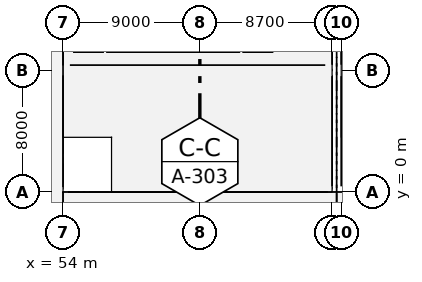
"""IFC4 building model, lengths in metres.
Left out: names, types, materials, properties, quantities, classifications, styles, units other than length and angle.
Written with IfcOpenShell. Run it as: python <this file> out.ifc"""

import sys

from ifc_helpers import new_model, si_unit, direction, frame, frame_2d, origin, origin_2d, place, context, subcontext, project, spatial, rectangle, extrude, element, fill, save


model = new_model("IFC4")
c1 = context("Model", 3, precision=1e-05, world=origin(), true_north=direction((0.0, 1.0)))
c2 = subcontext(c1, "Body", "Model", "MODEL_VIEW")
j1 = project(units=[si_unit("LENGTHUNIT", "METRE"), si_unit("PLANEANGLEUNIT", "RADIAN")], contexts=[c1])
p1 = place(None, origin())
s1 = spatial("IfcSite", under=j1, at=p1, CompositionType="ELEMENT")
p2 = place(p1, origin())
s2 = spatial("IfcBuilding", under=s1, at=p2, CompositionType="ELEMENT")
p3 = place(p2, origin())
s3 = spatial("IfcBuildingStorey", under=s2, at=p3, CompositionType="ELEMENT", Elevation=0.0)
for number, where, z_axis, x_axis in (
    (1, (54.0, 0.0, -0.5), (0.0, 0.0, 1.0), (1.0, 0.0, 0.0)),
    (2, (54.0, 8.0, -0.5), (0.0, 0.0, 1.0), (1.0, 0.0, 0.0)),
    (3, (63.0, 0.0, -0.5), (0.0, 0.0, 1.0), (1.0, 0.0, 0.0)),
    (4, (63.0, 8.0, -0.5), (0.0, 0.0, 1.0), (1.0, 0.0, 0.0)),
):
    element("IfcColumn", number, at=place(p3, frame(where, z_axis=z_axis, x_axis=x_axis)), inside=s3, PredefinedType="COLUMN", context=c2, shape_type="SweptSolid", body=[
        extrude(rectangle(XDim=0.65, YDim=0.65, at=origin_2d()), origin(), (0.0, 0.0, 1.0), 6.8),
    ])
for number, where, z_axis, x_axis in (
    (5, (71.7, 0.0, -0.5), (0.0, 0.0, 1.0), (1.0, 0.0, 0.0)),
    (6, (71.7, 8.0, -0.5), (0.0, 0.0, 1.0), (1.0, 0.0, 0.0)),
    (7, (72.3, 0.0, -0.5), (0.0, 0.0, 1.0), (1.0, 0.0, 0.0)),
    (8, (72.3, 8.0, -0.5), (0.0, 0.0, 1.0), (1.0, 0.0, 0.0)),
):
    element("IfcColumn", number, at=place(p3, frame(where, z_axis=z_axis, x_axis=x_axis)), inside=s3, PredefinedType="COLUMN", context=c2, shape_type="SweptSolid", body=[
        extrude(rectangle(XDim=0.55, YDim=0.75, at=origin_2d()), origin(), (0.0, 0.0, 1.0), 6.8),
    ])
p4 = place(p3, frame((54.325, 0.0, 0.0), z_axis=(0.0, 0.0, 1.0), x_axis=(1.0, 0.0, 0.0)))
e9 = element("IfcWall", 9, at=p4, inside=s3, PredefinedType="SOLIDWALL", context=c2, shape_type="SweptSolid", body=[
    extrude(rectangle(XDim=8.35, YDim=0.34, at=frame_2d((4.175, 0.0))), origin(), (0.0, 0.0, 1.0), 4.98),
])
p5 = place(p4, frame((1.883, 0.0, 0.85)))
e10 = element("IfcOpeningElement", 10, at=p5, cuts=e9, PredefinedType="OPENING", context=c2, shape_type="SweptSolid", body=[
    extrude(rectangle(XDim=1.8, YDim=3.15, at=frame_2d((0.9, 1.575))), frame((0.0, 0.18, 0.0), z_axis=(0.0, -1.0, 0.0), x_axis=(1.0, 0.0, 0.0)), (0.0, 0.0, 1.0), 0.36),
])
p6 = place(p4, frame((4.667, 0.0, 0.85)))
e11 = element("IfcOpeningElement", 11, at=p6, cuts=e9, PredefinedType="OPENING", context=c2, shape_type="SweptSolid", body=[
    extrude(rectangle(XDim=1.8, YDim=3.15, at=frame_2d((0.9, 1.575))), frame((0.0, 0.18, 0.0), z_axis=(0.0, -1.0, 0.0), x_axis=(1.0, 0.0, 0.0)), (0.0, 0.0, 1.0), 0.36),
])
p7 = place(p3, frame((63.325, 0.0, 0.0), z_axis=(0.0, 0.0, 1.0), x_axis=(1.0, 0.0, 0.0)))
e12 = element("IfcWall", 12, at=p7, inside=s3, PredefinedType="SOLIDWALL", context=c2, shape_type="SweptSolid", body=[
    extrude(rectangle(XDim=8.1, YDim=0.34, at=frame_2d((4.05, 0.0))), origin(), (0.0, 0.0, 1.0), 4.98),
])
p8 = place(p7, frame((1.8, 0.0, 0.85)))
e13 = element("IfcOpeningElement", 13, at=p8, cuts=e12, PredefinedType="OPENING", context=c2, shape_type="SweptSolid", body=[
    extrude(rectangle(XDim=1.8, YDim=3.15, at=frame_2d((0.9, 1.575))), frame((0.0, 0.18, 0.0), z_axis=(0.0, -1.0, 0.0), x_axis=(1.0, 0.0, 0.0)), (0.0, 0.0, 1.0), 0.36),
])
p9 = place(p7, frame((4.5, 0.0, 0.85)))
e14 = element("IfcOpeningElement", 14, at=p9, cuts=e12, PredefinedType="OPENING", context=c2, shape_type="SweptSolid", body=[
    extrude(rectangle(XDim=1.8, YDim=3.15, at=frame_2d((0.9, 1.575))), frame((0.0, 0.18, 0.0), z_axis=(0.0, -1.0, 0.0), x_axis=(1.0, 0.0, 0.0)), (0.0, 0.0, 1.0), 0.36),
])
p10 = place(p3, frame((54.0, 0.325, 0.0), z_axis=(0.0, 0.0, 1.0), x_axis=(0.0, 1.0, 0.0)))
e15 = element("IfcWall", 15, at=p10, inside=s3, PredefinedType="SOLIDWALL", context=c2, shape_type="SweptSolid", body=[
    extrude(rectangle(XDim=7.35, YDim=0.34, at=frame_2d((3.675, 0.0))), origin(), (0.0, 0.0, 1.0), 5.23),
])
p11 = place(p10, frame((1.55, 0.0, 0.85)))
e16 = element("IfcOpeningElement", 16, at=p11, cuts=e15, PredefinedType="OPENING", context=c2, shape_type="SweptSolid", body=[
    extrude(rectangle(XDim=1.8, YDim=3.15, at=frame_2d((0.9, 1.575))), frame((0.0, 0.18, 0.0), z_axis=(0.0, -1.0, 0.0), x_axis=(1.0, 0.0, 0.0)), (0.0, 0.0, 1.0), 0.36),
])
p12 = place(p10, frame((4.0, 0.0, 0.85)))
e17 = element("IfcOpeningElement", 17, at=p12, cuts=e15, PredefinedType="OPENING", context=c2, shape_type="SweptSolid", body=[
    extrude(rectangle(XDim=1.8, YDim=3.15, at=frame_2d((0.9, 1.575))), frame((0.0, 0.18, 0.0), z_axis=(0.0, -1.0, 0.0), x_axis=(1.0, 0.0, 0.0)), (0.0, 0.0, 1.0), 0.36),
])
p13 = place(p3, frame((54.0, 8.325, 0.0), z_axis=(0.0, 0.0, 1.0), x_axis=(0.0, 1.0, 0.0)))
e18 = element("IfcWall", 18, at=p13, inside=s3, PredefinedType="SOLIDWALL", context=c2, shape_type="SweptSolid", body=[
    extrude(rectangle(XDim=7.35, YDim=0.34, at=frame_2d((3.675, 0.0))), origin(), (0.0, 0.0, 1.0), 5.23),
])
p14 = place(p13, frame((1.55, 0.0, 0.85)))
e19 = element("IfcOpeningElement", 19, at=p14, cuts=e18, PredefinedType="OPENING", context=c2, shape_type="SweptSolid", body=[
    extrude(rectangle(XDim=1.8, YDim=3.15, at=frame_2d((0.9, 1.575))), frame((0.0, 0.18, 0.0), z_axis=(0.0, -1.0, 0.0), x_axis=(1.0, 0.0, 0.0)), (0.0, 0.0, 1.0), 0.36),
])
p15 = place(p13, frame((4.0, 0.0, 0.85)))
e20 = element("IfcOpeningElement", 20, at=p15, cuts=e18, PredefinedType="OPENING", context=c2, shape_type="SweptSolid", body=[
    extrude(rectangle(XDim=1.8, YDim=3.15, at=frame_2d((0.9, 1.575))), frame((0.0, 0.18, 0.0), z_axis=(0.0, -1.0, 0.0), x_axis=(1.0, 0.0, 0.0)), (0.0, 0.0, 1.0), 0.36),
])
p16 = place(p3, frame((71.7, 0.375, 0.0), z_axis=(0.0, 0.0, 1.0), x_axis=(0.0, 1.0, 0.0)))
e21 = element("IfcWall", 21, at=p16, inside=s3, PredefinedType="SOLIDWALL", context=c2, shape_type="SweptSolid", body=[
    extrude(rectangle(XDim=7.25, YDim=0.34, at=frame_2d((3.625, 0.0))), origin(), (0.0, 0.0, 1.0), 4.98),
])
p17 = place(p16, frame((1.517, 0.0, 0.85)))
e22 = element("IfcOpeningElement", 22, at=p17, cuts=e21, PredefinedType="OPENING", context=c2, shape_type="SweptSolid", body=[
    extrude(rectangle(XDim=1.8, YDim=3.15, at=frame_2d((0.9, 1.575))), frame((0.0, 0.18, 0.0), z_axis=(0.0, -1.0, 0.0), x_axis=(1.0, 0.0, 0.0)), (0.0, 0.0, 1.0), 0.36),
])
p18 = place(p16, frame((3.933, 0.0, 0.85)))
e23 = element("IfcOpeningElement", 23, at=p18, cuts=e21, PredefinedType="OPENING", context=c2, shape_type="SweptSolid", body=[
    extrude(rectangle(XDim=1.8, YDim=3.15, at=frame_2d((0.9, 1.575))), frame((0.0, 0.18, 0.0), z_axis=(0.0, -1.0, 0.0), x_axis=(1.0, 0.0, 0.0)), (0.0, 0.0, 1.0), 0.36),
])
p19 = place(p3, frame((71.7, 8.375, 0.0), z_axis=(0.0, 0.0, 1.0), x_axis=(0.0, 1.0, 0.0)))
e24 = element("IfcWall", 24, at=p19, inside=s3, PredefinedType="SOLIDWALL", context=c2, shape_type="SweptSolid", body=[
    extrude(rectangle(XDim=7.25, YDim=0.34, at=frame_2d((3.625, 0.0))), origin(), (0.0, 0.0, 1.0), 4.98),
])
p20 = place(p19, frame((1.517, 0.0, 0.85)))
e25 = element("IfcOpeningElement", 25, at=p20, cuts=e24, PredefinedType="OPENING", context=c2, shape_type="SweptSolid", body=[
    extrude(rectangle(XDim=1.8, YDim=3.15, at=frame_2d((0.9, 1.575))), frame((0.0, 0.18, 0.0), z_axis=(0.0, -1.0, 0.0), x_axis=(1.0, 0.0, 0.0)), (0.0, 0.0, 1.0), 0.36),
])
p21 = place(p19, frame((3.933, 0.0, 0.85)))
e26 = element("IfcOpeningElement", 26, at=p21, cuts=e24, PredefinedType="OPENING", context=c2, shape_type="SweptSolid", body=[
    extrude(rectangle(XDim=1.8, YDim=3.15, at=frame_2d((0.9, 1.575))), frame((0.0, 0.18, 0.0), z_axis=(0.0, -1.0, 0.0), x_axis=(1.0, 0.0, 0.0)), (0.0, 0.0, 1.0), 0.36),
])
p22 = place(p3, frame((72.3, 0.375, 0.0), z_axis=(0.0, 0.0, 1.0), x_axis=(0.0, 1.0, 0.0)))
e27 = element("IfcWall", 27, at=p22, inside=s3, PredefinedType="SOLIDWALL", context=c2, shape_type="SweptSolid", body=[
    extrude(rectangle(XDim=7.25, YDim=0.34, at=frame_2d((3.625, 0.0))), origin(), (0.0, 0.0, 1.0), 5.1),
])
p23 = place(p22, frame((1.517, 0.0, 0.85)))
e28 = element("IfcOpeningElement", 28, at=p23, cuts=e27, PredefinedType="OPENING", context=c2, shape_type="SweptSolid", body=[
    extrude(rectangle(XDim=1.8, YDim=3.15, at=frame_2d((0.9, 1.575))), frame((0.0, 0.18, 0.0), z_axis=(0.0, -1.0, 0.0), x_axis=(1.0, 0.0, 0.0)), (0.0, 0.0, 1.0), 0.36),
])
p24 = place(p22, frame((3.933, 0.0, 0.85)))
e29 = element("IfcOpeningElement", 29, at=p24, cuts=e27, PredefinedType="OPENING", context=c2, shape_type="SweptSolid", body=[
    extrude(rectangle(XDim=1.8, YDim=3.15, at=frame_2d((0.9, 1.575))), frame((0.0, 0.18, 0.0), z_axis=(0.0, -1.0, 0.0), x_axis=(1.0, 0.0, 0.0)), (0.0, 0.0, 1.0), 0.36),
])
p25 = place(p3, frame((72.3, 8.375, 0.0), z_axis=(0.0, 0.0, 1.0), x_axis=(0.0, 1.0, 0.0)))
e30 = element("IfcWall", 30, at=p25, inside=s3, PredefinedType="SOLIDWALL", context=c2, shape_type="SweptSolid", body=[
    extrude(rectangle(XDim=7.25, YDim=0.34, at=frame_2d((3.625, 0.0))), origin(), (0.0, 0.0, 1.0), 5.1),
])
p26 = place(p25, frame((1.517, 0.0, 0.85)))
e31 = element("IfcOpeningElement", 31, at=p26, cuts=e30, PredefinedType="OPENING", context=c2, shape_type="SweptSolid", body=[
    extrude(rectangle(XDim=1.8, YDim=3.15, at=frame_2d((0.9, 1.575))), frame((0.0, 0.18, 0.0), z_axis=(0.0, -1.0, 0.0), x_axis=(1.0, 0.0, 0.0)), (0.0, 0.0, 1.0), 0.36),
])
p27 = place(p25, frame((3.933, 0.0, 0.85)))
e32 = element("IfcOpeningElement", 32, at=p27, cuts=e30, PredefinedType="OPENING", context=c2, shape_type="SweptSolid", body=[
    extrude(rectangle(XDim=1.8, YDim=3.15, at=frame_2d((0.9, 1.575))), frame((0.0, 0.18, 0.0), z_axis=(0.0, -1.0, 0.0), x_axis=(1.0, 0.0, 0.0)), (0.0, 0.0, 1.0), 0.36),
])
p28 = place(p3, frame((54.45, 8.35, 0.0), z_axis=(0.0, 0.0, 1.0), x_axis=(1.0, 0.0, 0.0)))
e33 = element("IfcWall", 33, at=p28, inside=s3, PredefinedType="STANDARD", context=c2, shape_type="SweptSolid", body=[
    extrude(rectangle(XDim=16.8, YDim=0.195, at=frame_2d((8.4, 0.0))), origin(), (0.0, 0.0, 1.0), 5.95),
])
p29 = place(p28, frame((3.375, 0.0, 0.0)))
e34 = element("IfcOpeningElement", 34, at=p29, cuts=e33, PredefinedType="OPENING", context=c2, shape_type="SweptSolid", body=[
    extrude(rectangle(XDim=1.8, YDim=2.3, at=frame_2d((0.9, 1.15))), frame((0.0, 0.107, 0.0), z_axis=(0.0, -1.0, 0.0), x_axis=(1.0, 0.0, 0.0)), (0.0, 0.0, 1.0), 0.215),
])
p30 = place(p5, origin())
e35 = element("IfcWindow", 35, at=p30, inside=s3, PartitioningType="DOUBLE_PANEL_VERTICAL", PredefinedType="WINDOW", context=c2, shape_type="SweptSolid", body=[
    extrude(rectangle(XDim=1.8, YDim=3.15, at=frame_2d((0.9, 1.575))), frame((0.0, 0.03, 0.0), z_axis=(0.0, -1.0, 0.0), x_axis=(1.0, 0.0, 0.0)), (0.0, 0.0, 1.0), 0.06),
])
fill(e10, e35)
p31 = place(p6, origin())
e36 = element("IfcWindow", 36, at=p31, inside=s3, PartitioningType="DOUBLE_PANEL_VERTICAL", PredefinedType="WINDOW", context=c2, shape_type="SweptSolid", body=[
    extrude(rectangle(XDim=1.8, YDim=3.15, at=frame_2d((0.9, 1.575))), frame((0.0, 0.03, 0.0), z_axis=(0.0, -1.0, 0.0), x_axis=(1.0, 0.0, 0.0)), (0.0, 0.0, 1.0), 0.06),
])
fill(e11, e36)
p32 = place(p8, origin())
e37 = element("IfcWindow", 37, at=p32, inside=s3, PartitioningType="DOUBLE_PANEL_VERTICAL", PredefinedType="WINDOW", context=c2, shape_type="SweptSolid", body=[
    extrude(rectangle(XDim=1.8, YDim=3.15, at=frame_2d((0.9, 1.575))), frame((0.0, 0.03, 0.0), z_axis=(0.0, -1.0, 0.0), x_axis=(1.0, 0.0, 0.0)), (0.0, 0.0, 1.0), 0.06),
])
fill(e13, e37)
p33 = place(p9, origin())
e38 = element("IfcWindow", 38, at=p33, inside=s3, PartitioningType="DOUBLE_PANEL_VERTICAL", PredefinedType="WINDOW", context=c2, shape_type="SweptSolid", body=[
    extrude(rectangle(XDim=1.8, YDim=3.15, at=frame_2d((0.9, 1.575))), frame((0.0, 0.03, 0.0), z_axis=(0.0, -1.0, 0.0), x_axis=(1.0, 0.0, 0.0)), (0.0, 0.0, 1.0), 0.06),
])
fill(e14, e38)
p34 = place(p11, origin())
e39 = element("IfcWindow", 39, at=p34, inside=s3, PartitioningType="DOUBLE_PANEL_VERTICAL", PredefinedType="WINDOW", context=c2, shape_type="SweptSolid", body=[
    extrude(rectangle(XDim=1.8, YDim=3.15, at=frame_2d((0.9, 1.575))), frame((0.0, 0.03, 0.0), z_axis=(0.0, -1.0, 0.0), x_axis=(1.0, 0.0, 0.0)), (0.0, 0.0, 1.0), 0.06),
])
fill(e16, e39)
p35 = place(p12, origin())
e40 = element("IfcWindow", 40, at=p35, inside=s3, PartitioningType="DOUBLE_PANEL_VERTICAL", PredefinedType="WINDOW", context=c2, shape_type="SweptSolid", body=[
    extrude(rectangle(XDim=1.8, YDim=3.15, at=frame_2d((0.9, 1.575))), frame((0.0, 0.03, 0.0), z_axis=(0.0, -1.0, 0.0), x_axis=(1.0, 0.0, 0.0)), (0.0, 0.0, 1.0), 0.06),
])
fill(e17, e40)
p36 = place(p17, origin())
e41 = element("IfcWindow", 41, at=p36, inside=s3, PartitioningType="DOUBLE_PANEL_VERTICAL", PredefinedType="WINDOW", context=c2, shape_type="SweptSolid", body=[
    extrude(rectangle(XDim=1.8, YDim=3.15, at=frame_2d((0.9, 1.575))), frame((0.0, 0.03, 0.0), z_axis=(0.0, -1.0, 0.0), x_axis=(1.0, 0.0, 0.0)), (0.0, 0.0, 1.0), 0.06),
])
fill(e22, e41)
p37 = place(p18, origin())
e42 = element("IfcWindow", 42, at=p37, inside=s3, PartitioningType="DOUBLE_PANEL_VERTICAL", PredefinedType="WINDOW", context=c2, shape_type="SweptSolid", body=[
    extrude(rectangle(XDim=1.8, YDim=3.15, at=frame_2d((0.9, 1.575))), frame((0.0, 0.03, 0.0), z_axis=(0.0, -1.0, 0.0), x_axis=(1.0, 0.0, 0.0)), (0.0, 0.0, 1.0), 0.06),
])
fill(e23, e42)
p38 = place(p23, origin())
e43 = element("IfcWindow", 43, at=p38, inside=s3, PartitioningType="DOUBLE_PANEL_VERTICAL", PredefinedType="WINDOW", context=c2, shape_type="SweptSolid", body=[
    extrude(rectangle(XDim=1.8, YDim=3.15, at=frame_2d((0.9, 1.575))), frame((0.0, 0.03, 0.0), z_axis=(0.0, -1.0, 0.0), x_axis=(1.0, 0.0, 0.0)), (0.0, 0.0, 1.0), 0.06),
])
fill(e28, e43)
p39 = place(p24, origin())
e44 = element("IfcWindow", 44, at=p39, inside=s3, PartitioningType="DOUBLE_PANEL_VERTICAL", PredefinedType="WINDOW", context=c2, shape_type="SweptSolid", body=[
    extrude(rectangle(XDim=1.8, YDim=3.15, at=frame_2d((0.9, 1.575))), frame((0.0, 0.03, 0.0), z_axis=(0.0, -1.0, 0.0), x_axis=(1.0, 0.0, 0.0)), (0.0, 0.0, 1.0), 0.06),
])
fill(e29, e44)
p40 = place(p29, origin())
e45 = element("IfcDoor", 45, at=p40, inside=s3, OperationType="SINGLE_SWING_LEFT", PredefinedType="DOOR", context=c2, shape_type="SweptSolid", body=[
    extrude(rectangle(XDim=1.8, YDim=2.3, at=frame_2d((0.9, 1.15))), frame((0.0, 0.025, 0.0), z_axis=(0.0, -1.0, 0.0), x_axis=(1.0, 0.0, 0.0)), (0.0, 0.0, 1.0), 0.05),
])
fill(e34, e45)
save(model, sys.argv[1])
